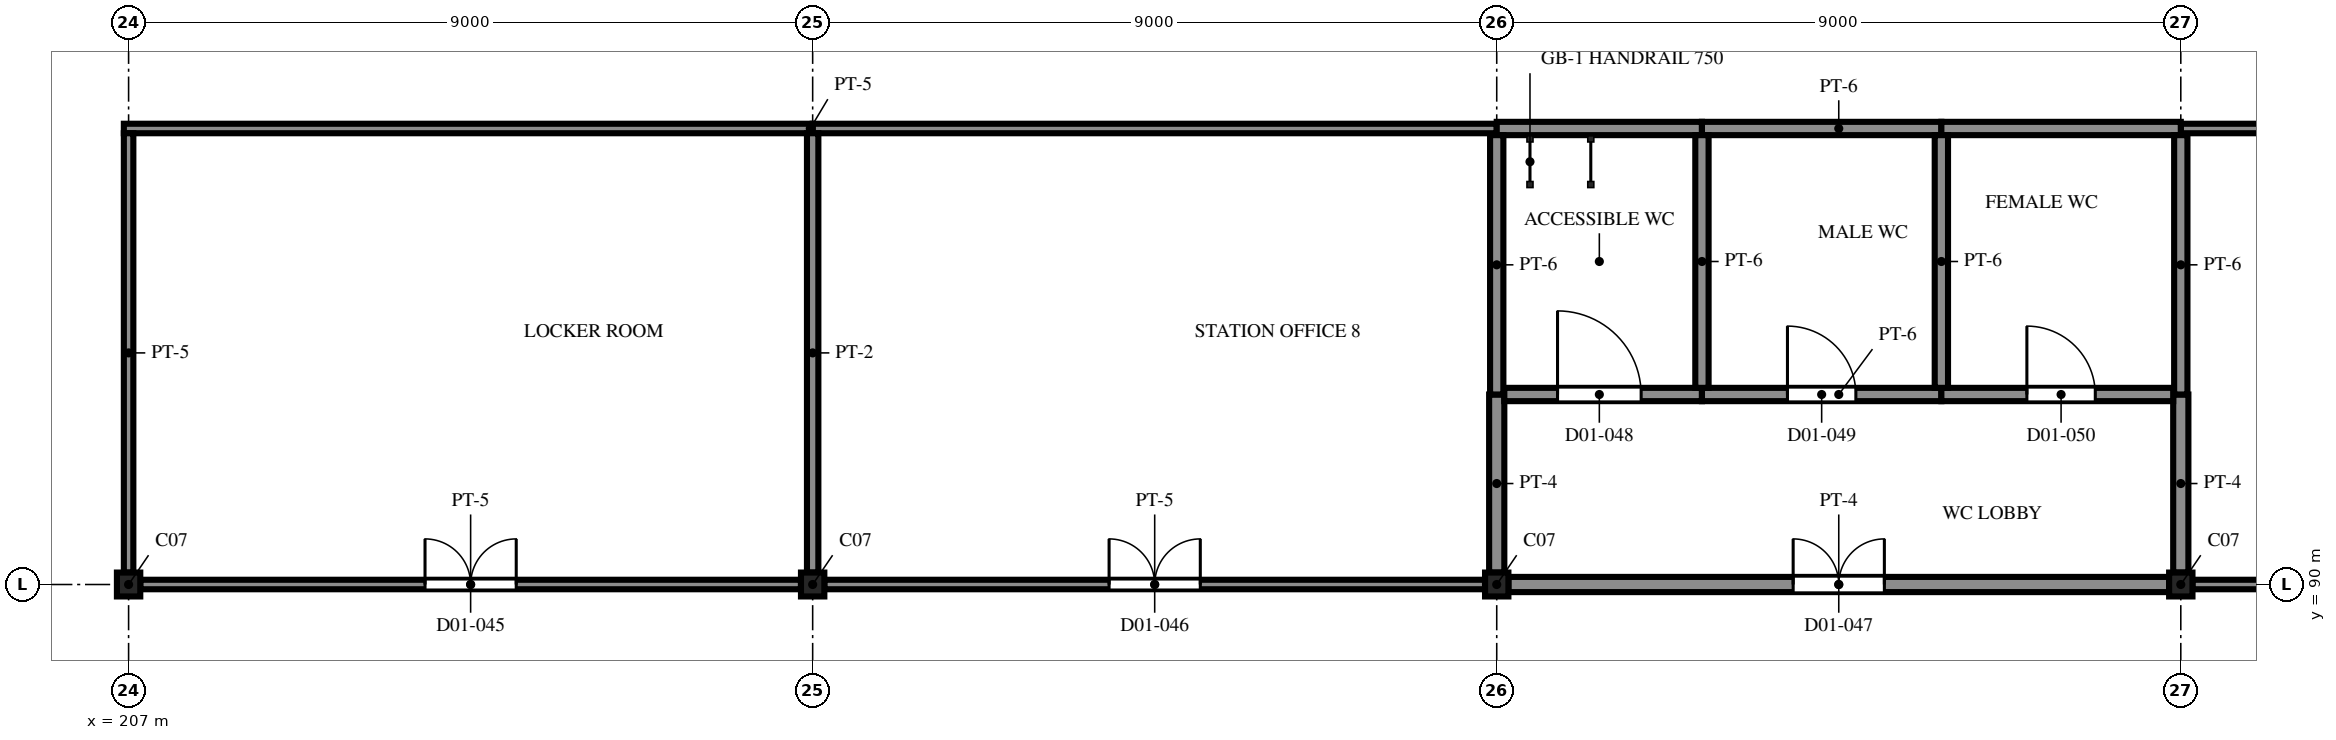
"""IFC4 building model, lengths in metres.
Left out: names, types, materials, properties, quantities, classifications, styles, units other than length and angle.
Written with IfcOpenShell. Run it as: python <this file> out.ifc"""

import sys

from ifc_helpers import new_model, si_unit, direction, frame, frame_2d, origin, origin_2d, place, context, subcontext, project, spatial, polyline, rectangle, i_section, outline, extrude, element, fill, save


model = new_model("IFC4")
c1 = context("Model", 3, precision=1e-05, world=origin(), true_north=direction((0.0, 1.0)))
c2 = subcontext(c1, "Body", "Model", "MODEL_VIEW")
j1 = project(units=[si_unit("LENGTHUNIT", "METRE"), si_unit("PLANEANGLEUNIT", "RADIAN")], contexts=[c1])
p1 = place(None, origin())
s1 = spatial("IfcSite", under=j1, at=p1, CompositionType="ELEMENT")
p2 = place(p1, origin())
s2 = spatial("IfcBuilding", under=s1, at=p2, CompositionType="ELEMENT")
p3 = place(p2, frame((0.0, 0.0, 7.5)))
s3 = spatial("IfcBuildingStorey", under=s2, at=p3, CompositionType="ELEMENT", Elevation=7.5)
for number, where, z_axis, x_axis in (
    (1, (207.0, 90.0, 0.0), (0.0, 0.0, 1.0), (1.0, 0.0, 0.0)),
    (2, (216.0, 90.0, 0.0), (0.0, 0.0, 1.0), (1.0, 0.0, 0.0)),
    (3, (225.0, 90.0, 0.0), (0.0, 0.0, 1.0), (1.0, 0.0, 0.0)),
    (4, (234.0, 90.0, 0.0), (0.0, 0.0, 1.0), (1.0, 0.0, 0.0)),
):
    element("IfcColumn", number, at=place(p3, frame(where, z_axis=z_axis, x_axis=x_axis)), inside=s3, PredefinedType="COLUMN", context=c2, shape_type="SweptSolid", body=[
        extrude(i_section(OverallWidth=0.307, OverallDepth=0.314, WebThickness=0.012, FlangeThickness=0.019, FilletRadius=0.015, at=origin_2d()), origin(), (0.0, 0.0, 1.0), 4.2),
    ])
p4 = place(p3, frame((242.858, 96.0, 0.0), z_axis=(0.0, 0.0, 1.0), x_axis=(-1.0, 0.0, 0.0)))
e5 = element("IfcWall", 5, at=p4, inside=s3, PredefinedType="PARTITIONING", context=c2, shape_type="SweptSolid", body=[
    extrude(rectangle(XDim=8.858, YDim=0.125, at=frame_2d((4.429, 0.0))), origin(), (0.0, 0.0, 1.0), 3.307),
])
p5 = place(p3, frame((225.0, 96.0, 0.0), z_axis=(0.0, 0.0, 1.0), x_axis=(-1.0, 0.0, 0.0)))
e6 = element("IfcWall", 6, at=p5, inside=s3, PredefinedType="PARTITIONING", context=c2, shape_type="SweptSolid", body=[
    extrude(rectangle(XDim=9.0, YDim=0.125, at=frame_2d((4.5, 0.0))), origin(), (0.0, 0.0, 1.0), 3.307),
])
p6 = place(p3, frame((216.0, 96.0, 0.0), z_axis=(0.0, 0.0, 1.0), x_axis=(-1.0, 0.0, 0.0)))
e7 = element("IfcWall", 7, at=p6, inside=s3, PredefinedType="PARTITIONING", context=c2, shape_type="SweptSolid", body=[
    extrude(rectangle(XDim=9.062, YDim=0.125, at=frame_2d((4.531, 0.0))), origin(), (0.0, 0.0, 1.0), 3.307),
])
p7 = place(p3, frame((227.7, 96.0, 0.0), z_axis=(0.0, 0.0, 1.0), x_axis=(-1.0, 0.0, 0.0)))
e8 = element("IfcWall", 8, at=p7, inside=s3, PredefinedType="PARTITIONING", context=c2, shape_type="SweptSolid", body=[
    extrude(rectangle(XDim=2.7, YDim=0.175, at=frame_2d((1.35, 0.0))), origin(), (0.0, 0.0, 1.0), 3.307),
])
p8 = place(p3, frame((230.85, 96.0, 0.0), z_axis=(0.0, 0.0, 1.0), x_axis=(-1.0, 0.0, 0.0)))
e9 = element("IfcWall", 9, at=p8, inside=s3, PredefinedType="PARTITIONING", context=c2, shape_type="SweptSolid", body=[
    extrude(rectangle(XDim=3.15, YDim=0.175, at=frame_2d((1.575, 0.0))), origin(), (0.0, 0.0, 1.0), 3.307),
])
p9 = place(p3, frame((234.0, 96.0, 0.0), z_axis=(0.0, 0.0, 1.0), x_axis=(-1.0, 0.0, 0.0)))
e10 = element("IfcWall", 10, at=p9, inside=s3, PredefinedType="PARTITIONING", context=c2, shape_type="SweptSolid", body=[
    extrude(rectangle(XDim=3.15, YDim=0.175, at=frame_2d((1.575, 0.0))), origin(), (0.0, 0.0, 1.0), 3.307),
])
p10 = place(p3, frame((225.154, 90.0, 0.0), z_axis=(0.0, 0.0, 1.0), x_axis=(1.0, 0.0, 0.0)))
e11 = element("IfcWall", 11, at=p10, inside=s3, PredefinedType="PARTITIONING", context=c2, shape_type="SweptSolid", body=[
    extrude(rectangle(XDim=8.692, YDim=0.2, at=frame_2d((4.346, 0.0))), origin(), (0.0, 0.0, 1.0), 3.382),
])
p11 = place(p10, frame((3.746, 0.0, 0.0)))
e12 = element("IfcOpeningElement", 12, at=p11, cuts=e11, PredefinedType="OPENING", context=c2, shape_type="SweptSolid", body=[
    extrude(rectangle(XDim=1.2, YDim=2.1, at=frame_2d((0.6, 1.05))), frame((0.0, 0.11, 0.0), z_axis=(0.0, -1.0, 0.0), x_axis=(1.0, 0.0, 0.0)), (0.0, 0.0, 1.0), 0.22),
])
p12 = place(p3, frame((234.154, 90.0, 0.0), z_axis=(0.0, 0.0, 1.0), x_axis=(1.0, 0.0, 0.0)))
e13 = element("IfcWall", 13, at=p12, inside=s3, PredefinedType="PARTITIONING", context=c2, shape_type="SweptSolid", body=[
    extrude(rectangle(XDim=8.692, YDim=0.125, at=frame_2d((4.346, 0.0))), origin(), (0.0, 0.0, 1.0), 3.307),
])
p13 = place(p12, frame((3.746, 0.0, 0.0)))
e14 = element("IfcOpeningElement", 14, at=p13, cuts=e13, PredefinedType="OPENING", context=c2, shape_type="SweptSolid", body=[
    extrude(rectangle(XDim=1.2, YDim=2.1, at=frame_2d((0.6, 1.05))), frame((0.0, 0.073, 0.0), z_axis=(0.0, -1.0, 0.0), x_axis=(1.0, 0.0, 0.0)), (0.0, 0.0, 1.0), 0.145),
])
p14 = place(p3, frame((216.154, 90.0, 0.0), z_axis=(0.0, 0.0, 1.0), x_axis=(1.0, 0.0, 0.0)))
e15 = element("IfcWall", 15, at=p14, inside=s3, PredefinedType="PARTITIONING", context=c2, shape_type="SweptSolid", body=[
    extrude(rectangle(XDim=8.692, YDim=0.125, at=frame_2d((4.346, 0.0))), origin(), (0.0, 0.0, 1.0), 3.307),
])
p15 = place(p14, frame((3.746, 0.0, 0.0)))
e16 = element("IfcOpeningElement", 16, at=p15, cuts=e15, PredefinedType="OPENING", context=c2, shape_type="SweptSolid", body=[
    extrude(rectangle(XDim=1.2, YDim=2.1, at=frame_2d((0.6, 1.05))), frame((0.0, 0.073, 0.0), z_axis=(0.0, -1.0, 0.0), x_axis=(1.0, 0.0, 0.0)), (0.0, 0.0, 1.0), 0.145),
])
p16 = place(p3, frame((207.154, 90.0, 0.0), z_axis=(0.0, 0.0, 1.0), x_axis=(1.0, 0.0, 0.0)))
e17 = element("IfcWall", 17, at=p16, inside=s3, PredefinedType="PARTITIONING", context=c2, shape_type="SweptSolid", body=[
    extrude(rectangle(XDim=8.692, YDim=0.125, at=frame_2d((4.346, 0.0))), origin(), (0.0, 0.0, 1.0), 3.307),
])
p17 = place(p16, frame((3.746, 0.0, 0.0)))
e18 = element("IfcOpeningElement", 18, at=p17, cuts=e17, PredefinedType="OPENING", context=c2, shape_type="SweptSolid", body=[
    extrude(rectangle(XDim=1.2, YDim=2.1, at=frame_2d((0.6, 1.05))), frame((0.0, 0.073, 0.0), z_axis=(0.0, -1.0, 0.0), x_axis=(1.0, 0.0, 0.0)), (0.0, 0.0, 1.0), 0.145),
])
p18 = place(p3, frame((207.0, 95.938, 0.0), z_axis=(0.0, 0.0, 1.0), x_axis=(0.0, -1.0, 0.0)))
e19 = element("IfcWall", 19, at=p18, inside=s3, PredefinedType="PARTITIONING", context=c2, shape_type="SweptSolid", body=[
    extrude(rectangle(XDim=5.78, YDim=0.125, at=frame_2d((2.89, 0.0))), origin(), (0.0, 0.0, 1.0), 3.307),
])
p19 = place(p3, frame((216.0, 95.938, 0.0), z_axis=(0.0, 0.0, 1.0), x_axis=(0.0, -1.0, 0.0)))
e20 = element("IfcWall", 20, at=p19, inside=s3, PredefinedType="PARTITIONING", context=c2, shape_type="SweptSolid", body=[
    extrude(rectangle(XDim=5.78, YDim=0.15, at=frame_2d((2.89, 0.0))), origin(), (0.0, 0.0, 1.0), 3.307),
])
p20 = place(p3, frame((225.0, 92.5, 0.0), z_axis=(0.0, 0.0, 1.0), x_axis=(0.0, -1.0, 0.0)))
e21 = element("IfcWall", 21, at=p20, inside=s3, PredefinedType="PARTITIONING", context=c2, shape_type="SweptSolid", body=[
    extrude(rectangle(XDim=2.343, YDim=0.2, at=frame_2d((1.171, 0.0))), origin(), (0.0, 0.0, 1.0), 3.382),
])
p21 = place(p3, frame((225.0, 95.913, 0.0), z_axis=(0.0, 0.0, 1.0), x_axis=(0.0, -1.0, 0.0)))
e22 = element("IfcWall", 22, at=p21, inside=s3, PredefinedType="PARTITIONING", context=c2, shape_type="SweptSolid", body=[
    extrude(rectangle(XDim=3.413, YDim=0.175, at=frame_2d((1.706, 0.0))), origin(), (0.0, 0.0, 1.0), 3.307),
])
p22 = place(p3, frame((234.0, 92.5, 0.0), z_axis=(0.0, 0.0, 1.0), x_axis=(0.0, -1.0, 0.0)))
e23 = element("IfcWall", 23, at=p22, inside=s3, PredefinedType="PARTITIONING", context=c2, shape_type="SweptSolid", body=[
    extrude(rectangle(XDim=2.343, YDim=0.2, at=frame_2d((1.171, 0.0))), origin(), (0.0, 0.0, 1.0), 3.382),
])
p23 = place(p3, frame((225.1, 92.5, 0.0), z_axis=(0.0, 0.0, 1.0), x_axis=(1.0, 0.0, 0.0)))
e24 = element("IfcWall", 24, at=p23, inside=s3, PredefinedType="PARTITIONING", context=c2, shape_type="SweptSolid", body=[
    extrude(rectangle(XDim=2.6, YDim=0.175, at=frame_2d((1.3, 0.0))), origin(), (0.0, 0.0, 1.0), 3.307),
])
p24 = place(p23, frame((0.7, 0.0, 0.0)))
e25 = element("IfcOpeningElement", 25, at=p24, cuts=e24, PredefinedType="OPENING", context=c2, shape_type="SweptSolid", body=[
    extrude(rectangle(XDim=1.1, YDim=2.1, at=frame_2d((0.55, 1.05))), frame((0.0, 0.097, 0.0), z_axis=(0.0, -1.0, 0.0), x_axis=(1.0, 0.0, 0.0)), (0.0, 0.0, 1.0), 0.195),
])
p25 = place(p3, frame((227.7, 92.5, 0.0), z_axis=(0.0, 0.0, 1.0), x_axis=(1.0, 0.0, 0.0)))
e26 = element("IfcWall", 26, at=p25, inside=s3, PredefinedType="PARTITIONING", context=c2, shape_type="SweptSolid", body=[
    extrude(rectangle(XDim=3.15, YDim=0.175, at=frame_2d((1.575, 0.0))), origin(), (0.0, 0.0, 1.0), 3.307),
])
p26 = place(p25, frame((1.125, 0.0, 0.0)))
e27 = element("IfcOpeningElement", 27, at=p26, cuts=e26, PredefinedType="OPENING", context=c2, shape_type="SweptSolid", body=[
    extrude(rectangle(XDim=0.9, YDim=2.1, at=frame_2d((0.45, 1.05))), frame((0.0, 0.097, 0.0), z_axis=(0.0, -1.0, 0.0), x_axis=(1.0, 0.0, 0.0)), (0.0, 0.0, 1.0), 0.195),
])
p27 = place(p3, frame((230.85, 92.5, 0.0), z_axis=(0.0, 0.0, 1.0), x_axis=(1.0, 0.0, 0.0)))
e28 = element("IfcWall", 28, at=p27, inside=s3, PredefinedType="PARTITIONING", context=c2, shape_type="SweptSolid", body=[
    extrude(rectangle(XDim=3.05, YDim=0.175, at=frame_2d((1.525, 0.0))), origin(), (0.0, 0.0, 1.0), 3.307),
])
p28 = place(p27, frame((1.125, 0.0, 0.0)))
e29 = element("IfcOpeningElement", 29, at=p28, cuts=e28, PredefinedType="OPENING", context=c2, shape_type="SweptSolid", body=[
    extrude(rectangle(XDim=0.9, YDim=2.1, at=frame_2d((0.45, 1.05))), frame((0.0, 0.097, 0.0), z_axis=(0.0, -1.0, 0.0), x_axis=(1.0, 0.0, 0.0)), (0.0, 0.0, 1.0), 0.195),
])
for number, where, z_axis, x_axis in (
    (30, (227.7, 95.913, 0.0), (0.0, 0.0, 1.0), (0.0, -1.0, 0.0)),
    (31, (230.85, 95.913, 0.0), (0.0, 0.0, 1.0), (0.0, -1.0, 0.0)),
):
    element("IfcWall", number, at=place(p3, frame(where, z_axis=z_axis, x_axis=x_axis)), inside=s3, PredefinedType="PARTITIONING", context=c2, shape_type="SweptSolid", body=[
        extrude(rectangle(XDim=3.325, YDim=0.175, at=frame_2d((1.663, 0.0))), origin(), (0.0, 0.0, 1.0), 3.307),
    ])
p29 = place(p3, frame((234.0, 95.913, 0.0), z_axis=(0.0, 0.0, 1.0), x_axis=(0.0, -1.0, 0.0)))
e32 = element("IfcWall", 32, at=p29, inside=s3, PredefinedType="PARTITIONING", context=c2, shape_type="SweptSolid", body=[
    extrude(rectangle(XDim=3.413, YDim=0.175, at=frame_2d((1.706, 0.0))), origin(), (0.0, 0.0, 1.0), 3.307),
])
p30 = place(p17, origin())
e33 = element("IfcDoor", 33, at=p30, inside=s3, OperationType="DOUBLE_DOOR_SINGLE_SWING", PredefinedType="DOOR", context=c2, shape_type="SweptSolid", body=[
    extrude(outline(polyline([(0.0, 0.0), (0.07, 0.0), (0.07, 2.03), (1.13, 2.03), (1.13, 0.0), (1.2, 0.0), (1.2, 2.1), (0.0, 2.1), (0.0, 0.0)])), frame((0.0, 0.025, 0.0), z_axis=(0.0, -1.0, 0.0), x_axis=(1.0, 0.0, 0.0)), (0.0, 0.0, 1.0), 0.05),
    extrude(outline(polyline([(0.074, 0.01), (0.597, 0.01), (0.597, 2.026), (0.074, 2.026), (0.074, 0.01)]), holes=[polyline([(0.178, 0.373), (0.492, 0.373), (0.492, 1.784), (0.178, 1.784), (0.178, 0.373)])]), frame((0.0, 0.017, 0.0), z_axis=(0.0, -1.0, 0.0), x_axis=(1.0, 0.0, 0.0)), (0.0, 0.0, 1.0), 0.035),
    extrude(rectangle(XDim=0.314, YDim=1.411, at=frame_2d((0.335, 1.079))), frame((0.0, 0.009, 0.0), z_axis=(0.0, -1.0, 0.0), x_axis=(1.0, 0.0, 0.0)), (0.0, 0.0, 1.0), 0.017),
    extrude(outline(polyline([(0.603, 0.01), (1.126, 0.01), (1.126, 2.026), (0.603, 2.026), (0.603, 0.01)]), holes=[polyline([(0.708, 0.373), (1.021, 0.373), (1.021, 1.784), (0.708, 1.784), (0.708, 0.373)])]), frame((0.0, 0.017, 0.0), z_axis=(0.0, -1.0, 0.0), x_axis=(1.0, 0.0, 0.0)), (0.0, 0.0, 1.0), 0.035),
    extrude(rectangle(XDim=0.314, YDim=1.411, at=frame_2d((0.865, 1.079))), frame((0.0, 0.009, 0.0), z_axis=(0.0, -1.0, 0.0), x_axis=(1.0, 0.0, 0.0)), (0.0, 0.0, 1.0), 0.017),
])
fill(e18, e33)
p31 = place(p15, origin())
e34 = element("IfcDoor", 34, at=p31, inside=s3, OperationType="DOUBLE_DOOR_SINGLE_SWING", PredefinedType="DOOR", context=c2, shape_type="SweptSolid", body=[
    extrude(outline(polyline([(0.0, 0.0), (0.07, 0.0), (0.07, 2.03), (1.13, 2.03), (1.13, 0.0), (1.2, 0.0), (1.2, 2.1), (0.0, 2.1), (0.0, 0.0)])), frame((0.0, 0.025, 0.0), z_axis=(0.0, -1.0, 0.0), x_axis=(1.0, 0.0, 0.0)), (0.0, 0.0, 1.0), 0.05),
    extrude(outline(polyline([(0.074, 0.01), (0.597, 0.01), (0.597, 2.026), (0.074, 2.026), (0.074, 0.01)]), holes=[polyline([(0.178, 0.373), (0.492, 0.373), (0.492, 1.784), (0.178, 1.784), (0.178, 0.373)])]), frame((0.0, 0.017, 0.0), z_axis=(0.0, -1.0, 0.0), x_axis=(1.0, 0.0, 0.0)), (0.0, 0.0, 1.0), 0.035),
    extrude(rectangle(XDim=0.314, YDim=1.411, at=frame_2d((0.335, 1.079))), frame((0.0, 0.009, 0.0), z_axis=(0.0, -1.0, 0.0), x_axis=(1.0, 0.0, 0.0)), (0.0, 0.0, 1.0), 0.017),
    extrude(outline(polyline([(0.603, 0.01), (1.126, 0.01), (1.126, 2.026), (0.603, 2.026), (0.603, 0.01)]), holes=[polyline([(0.708, 0.373), (1.021, 0.373), (1.021, 1.784), (0.708, 1.784), (0.708, 0.373)])]), frame((0.0, 0.017, 0.0), z_axis=(0.0, -1.0, 0.0), x_axis=(1.0, 0.0, 0.0)), (0.0, 0.0, 1.0), 0.035),
    extrude(rectangle(XDim=0.314, YDim=1.411, at=frame_2d((0.865, 1.079))), frame((0.0, 0.009, 0.0), z_axis=(0.0, -1.0, 0.0), x_axis=(1.0, 0.0, 0.0)), (0.0, 0.0, 1.0), 0.017),
])
fill(e16, e34)
p32 = place(p11, origin())
e35 = element("IfcDoor", 35, at=p32, inside=s3, OperationType="DOUBLE_DOOR_SINGLE_SWING", PredefinedType="DOOR", context=c2, shape_type="SweptSolid", body=[
    extrude(outline(polyline([(0.0, 0.0), (0.07, 0.0), (0.07, 2.03), (1.13, 2.03), (1.13, 0.0), (1.2, 0.0), (1.2, 2.1), (0.0, 2.1), (0.0, 0.0)])), frame((0.0, 0.025, 0.0), z_axis=(0.0, -1.0, 0.0), x_axis=(1.0, 0.0, 0.0)), (0.0, 0.0, 1.0), 0.05),
    extrude(outline(polyline([(0.074, 0.01), (0.597, 0.01), (0.597, 2.026), (0.074, 2.026), (0.074, 0.01)]), holes=[polyline([(0.178, 0.373), (0.492, 0.373), (0.492, 1.784), (0.178, 1.784), (0.178, 0.373)])]), frame((0.0, 0.017, 0.0), z_axis=(0.0, -1.0, 0.0), x_axis=(1.0, 0.0, 0.0)), (0.0, 0.0, 1.0), 0.035),
    extrude(rectangle(XDim=0.314, YDim=1.411, at=frame_2d((0.335, 1.079))), frame((0.0, 0.009, 0.0), z_axis=(0.0, -1.0, 0.0), x_axis=(1.0, 0.0, 0.0)), (0.0, 0.0, 1.0), 0.017),
    extrude(outline(polyline([(0.603, 0.01), (1.126, 0.01), (1.126, 2.026), (0.603, 2.026), (0.603, 0.01)]), holes=[polyline([(0.708, 0.373), (1.021, 0.373), (1.021, 1.784), (0.708, 1.784), (0.708, 0.373)])]), frame((0.0, 0.017, 0.0), z_axis=(0.0, -1.0, 0.0), x_axis=(1.0, 0.0, 0.0)), (0.0, 0.0, 1.0), 0.035),
    extrude(rectangle(XDim=0.314, YDim=1.411, at=frame_2d((0.865, 1.079))), frame((0.0, 0.009, 0.0), z_axis=(0.0, -1.0, 0.0), x_axis=(1.0, 0.0, 0.0)), (0.0, 0.0, 1.0), 0.017),
])
fill(e12, e35)
p33 = place(p24, origin())
e36 = element("IfcDoor", 36, at=p33, inside=s3, OperationType="SINGLE_SWING_LEFT", PredefinedType="DOOR", context=c2, shape_type="SweptSolid", body=[
    extrude(outline(polyline([(0.0, 0.0), (0.07, 0.0), (0.07, 2.03), (1.03, 2.03), (1.03, 0.0), (1.1, 0.0), (1.1, 2.1), (0.0, 2.1), (0.0, 0.0)])), frame((0.0, 0.025, 0.0), z_axis=(0.0, -1.0, 0.0), x_axis=(1.0, 0.0, 0.0)), (0.0, 0.0, 1.0), 0.05),
    extrude(outline(polyline([(0.074, 0.01), (1.026, 0.01), (1.026, 2.026), (0.074, 2.026), (0.074, 0.01)]), holes=[polyline([(0.194, 0.16), (0.906, 0.16), (0.906, 1.01), (0.194, 1.01), (0.194, 0.16)]), polyline([(0.4, 1.16), (0.7, 1.16), (0.7, 1.76), (0.4, 1.76), (0.4, 1.16)])]), frame((0.0, 0.017, 0.0), z_axis=(0.0, -1.0, 0.0), x_axis=(1.0, 0.0, 0.0)), (0.0, 0.0, 1.0), 0.035),
    extrude(rectangle(XDim=0.712, YDim=0.85, at=frame_2d((0.55, 0.585))), frame((0.0, 0.009, 0.0), z_axis=(0.0, -1.0, 0.0), x_axis=(1.0, 0.0, 0.0)), (0.0, 0.0, 1.0), 0.017),
    extrude(rectangle(XDim=0.3, YDim=0.6, at=frame_2d((0.55, 1.46))), frame((0.0, 0.006, 0.0), z_axis=(0.0, -1.0, 0.0), x_axis=(1.0, 0.0, 0.0)), (0.0, 0.0, 1.0), 0.012),
])
fill(e25, e36)
p34 = place(p26, origin())
e37 = element("IfcDoor", 37, at=p34, inside=s3, OperationType="SINGLE_SWING_LEFT", PredefinedType="DOOR", context=c2, shape_type="SweptSolid", body=[
    extrude(outline(polyline([(0.0, 0.0), (0.07, 0.0), (0.07, 2.03), (0.83, 2.03), (0.83, 0.0), (0.9, 0.0), (0.9, 2.1), (0.0, 2.1), (0.0, 0.0)])), frame((0.0, 0.025, 0.0), z_axis=(0.0, -1.0, 0.0), x_axis=(1.0, 0.0, 0.0)), (0.0, 0.0, 1.0), 0.05),
    extrude(outline(polyline([(0.074, 0.01), (0.826, 0.01), (0.826, 2.026), (0.074, 2.026), (0.074, 0.01)]), holes=[polyline([(0.194, 0.16), (0.706, 0.16), (0.706, 1.01), (0.194, 1.01), (0.194, 0.16)]), polyline([(0.3, 1.16), (0.6, 1.16), (0.6, 1.76), (0.3, 1.76), (0.3, 1.16)])]), frame((0.0, 0.017, 0.0), z_axis=(0.0, -1.0, 0.0), x_axis=(1.0, 0.0, 0.0)), (0.0, 0.0, 1.0), 0.035),
    extrude(rectangle(XDim=0.512, YDim=0.85, at=frame_2d((0.45, 0.585))), frame((0.0, 0.009, 0.0), z_axis=(0.0, -1.0, 0.0), x_axis=(1.0, 0.0, 0.0)), (0.0, 0.0, 1.0), 0.017),
    extrude(rectangle(XDim=0.3, YDim=0.6, at=frame_2d((0.45, 1.46))), frame((0.0, 0.006, 0.0), z_axis=(0.0, -1.0, 0.0), x_axis=(1.0, 0.0, 0.0)), (0.0, 0.0, 1.0), 0.012),
])
fill(e27, e37)
p35 = place(p28, origin())
e38 = element("IfcDoor", 38, at=p35, inside=s3, OperationType="SINGLE_SWING_LEFT", PredefinedType="DOOR", context=c2, shape_type="SweptSolid", body=[
    extrude(outline(polyline([(0.0, 0.0), (0.07, 0.0), (0.07, 2.03), (0.83, 2.03), (0.83, 0.0), (0.9, 0.0), (0.9, 2.1), (0.0, 2.1), (0.0, 0.0)])), frame((0.0, 0.025, 0.0), z_axis=(0.0, -1.0, 0.0), x_axis=(1.0, 0.0, 0.0)), (0.0, 0.0, 1.0), 0.05),
    extrude(outline(polyline([(0.074, 0.01), (0.826, 0.01), (0.826, 2.026), (0.074, 2.026), (0.074, 0.01)]), holes=[polyline([(0.194, 0.16), (0.706, 0.16), (0.706, 1.01), (0.194, 1.01), (0.194, 0.16)]), polyline([(0.3, 1.16), (0.6, 1.16), (0.6, 1.76), (0.3, 1.76), (0.3, 1.16)])]), frame((0.0, 0.017, 0.0), z_axis=(0.0, -1.0, 0.0), x_axis=(1.0, 0.0, 0.0)), (0.0, 0.0, 1.0), 0.035),
    extrude(rectangle(XDim=0.512, YDim=0.85, at=frame_2d((0.45, 0.585))), frame((0.0, 0.009, 0.0), z_axis=(0.0, -1.0, 0.0), x_axis=(1.0, 0.0, 0.0)), (0.0, 0.0, 1.0), 0.017),
    extrude(rectangle(XDim=0.3, YDim=0.6, at=frame_2d((0.45, 1.46))), frame((0.0, 0.006, 0.0), z_axis=(0.0, -1.0, 0.0), x_axis=(1.0, 0.0, 0.0)), (0.0, 0.0, 1.0), 0.012),
])
fill(e29, e38)
save(model, sys.argv[1])
